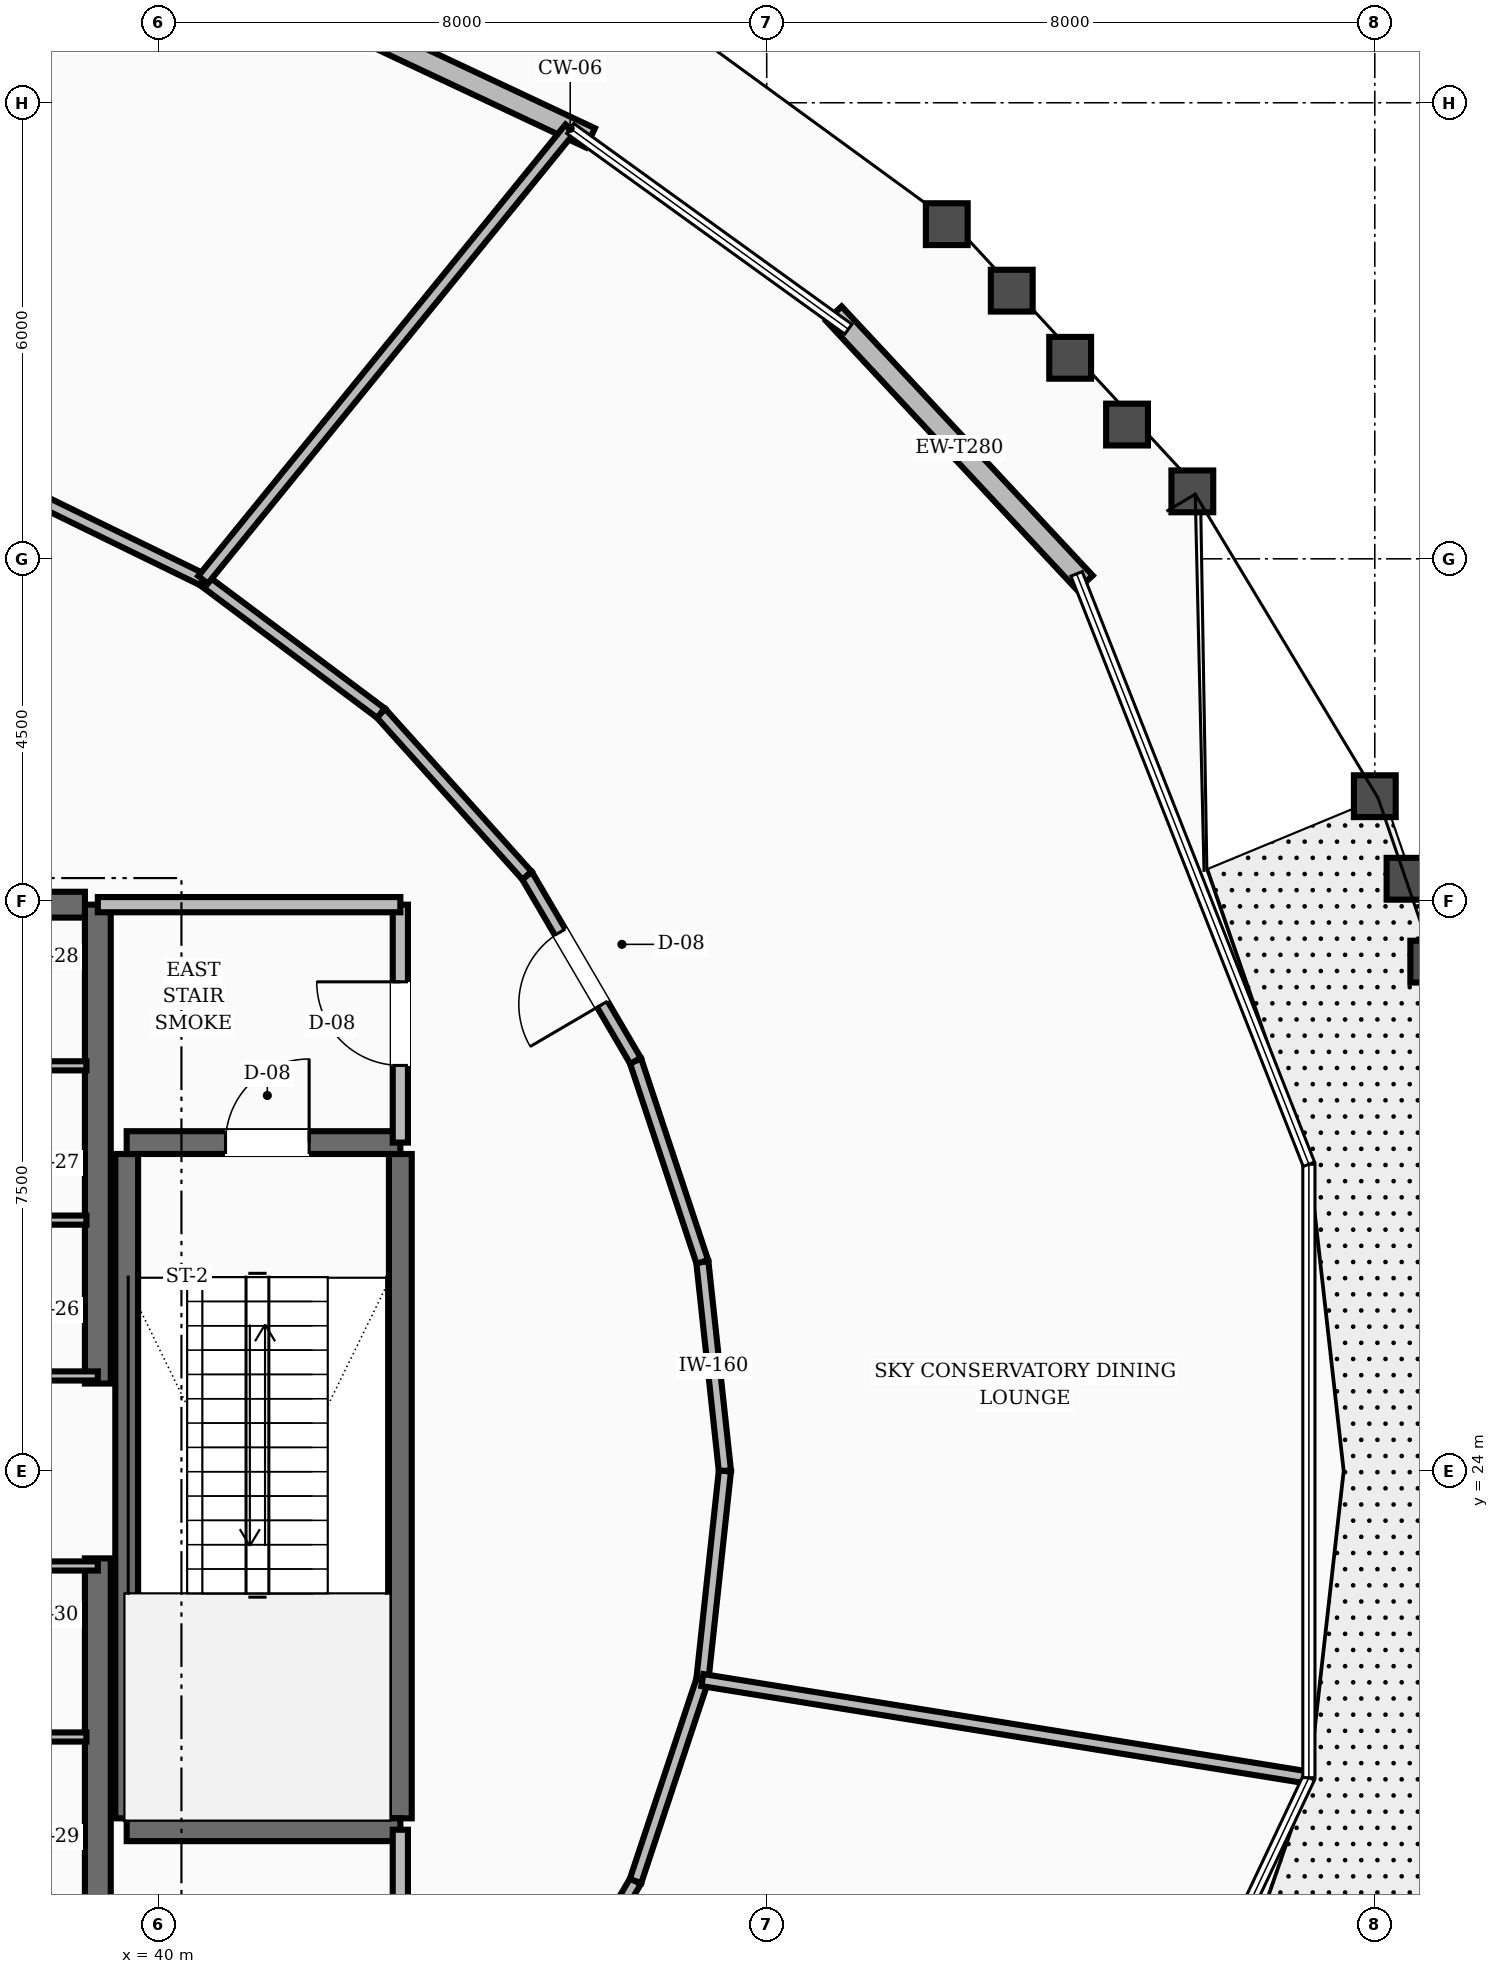
"""IFC4 building model, lengths in metres.
Left out: names, types, materials, properties, quantities, classifications, styles, units other than length and angle.
Written with IfcOpenShell. Run it as: python <this file> out.ifc"""

import sys

from ifc_helpers import new_model, si_unit, direction, frame, frame_2d, origin, place, context, subcontext, project, spatial, rectangle, extrude, element, fill, save


model = new_model("IFC4")
c1 = context("Model", 3, precision=1e-05, world=origin(), true_north=direction((0.0, 1.0)))
c2 = subcontext(c1, "Body", "Model", "MODEL_VIEW")
j1 = project(units=[si_unit("LENGTHUNIT", "METRE"), si_unit("PLANEANGLEUNIT", "RADIAN")], contexts=[c1])
p1 = place(None, origin())
s1 = spatial("IfcSite", under=j1, at=p1, CompositionType="ELEMENT")
p2 = place(p1, origin())
s2 = spatial("IfcBuilding", under=s1, at=p2, CompositionType="ELEMENT")
p3 = place(p2, frame((0.0, 0.0, 203.6)))
s3 = spatial("IfcBuildingStorey", under=s2, at=p3, CompositionType="ELEMENT", Elevation=203.6)
for number, where, z_axis, x_axis in (
    (1, (39.2, 16.55, 0.0), (0.0, 0.0, 1.0), (0.0, 1.0, 0.0)),
    (2, (39.2, 25.15, 0.0), (0.0, 0.0, 1.0), (0.0, 1.0, 0.0)),
):
    element("IfcWall", number, at=place(p3, frame(where, z_axis=z_axis, x_axis=x_axis)), inside=s3, PredefinedType="SHEAR", context=c2, shape_type="SweptSolid", body=[
        extrude(rectangle(XDim=6.3, YDim=0.34, at=frame_2d((3.15, 0.0))), origin(), (0.0, 0.0, 1.0), 4.8),
    ])
p4 = place(p3, frame((35.8, 31.45, 0.0), z_axis=(0.0, 0.0, 1.0), x_axis=(1.0, 0.0, 0.0)))
e3 = element("IfcWall", 3, at=p4, inside=s3, PredefinedType="SHEAR", context=c2, shape_type="SweptSolid", body=[
    extrude(rectangle(XDim=3.23, YDim=0.34, at=frame_2d((1.615, 0.0))), origin(), (0.0, 0.0, 1.0), 4.8),
])
p5 = place(p4, frame((0.3, 0.0, 0.0)))
e4 = element("IfcOpeningElement", 4, at=p5, cuts=e3, PredefinedType="OPENING", context=c2, shape_type="SweptSolid", body=[
    extrude(rectangle(XDim=1.1, YDim=2.1, at=frame_2d((0.55, 1.05))), frame((0.0, 0.18, 0.0), z_axis=(0.0, -1.0, 0.0), x_axis=(1.0, 0.0, 0.0)), (0.0, 0.0, 1.0), 0.36),
])
for number, where, z_axis, x_axis in (
    (5, (43.18, 19.43, 0.0), (0.0, 0.0, 1.0), (0.0, 1.0, 0.0)),
    (6, (39.58, 19.43, 0.0), (0.0, 0.0, 1.0), (0.0, 1.0, 0.0)),
):
    element("IfcWall", number, at=place(p3, frame(where, z_axis=z_axis, x_axis=x_axis)), inside=s3, PredefinedType="SHEAR", context=c2, shape_type="SweptSolid", body=[
        extrude(rectangle(XDim=8.74, YDim=0.3, at=frame_2d((4.37, 0.0))), origin(), (0.0, 0.0, 1.0), 4.8),
    ])
p6 = place(p3, frame((39.58, 19.28, 0.0), z_axis=(0.0, 0.0, 1.0), x_axis=(1.0, 0.0, 0.0)))
e7 = element("IfcWall", 7, at=p6, inside=s3, PredefinedType="SHEAR", context=c2, shape_type="SweptSolid", body=[
    extrude(rectangle(XDim=3.6, YDim=0.3, at=frame_2d((1.8, 0.0))), origin(), (0.0, 0.0, 1.0), 4.8),
])
p7 = place(p3, frame((39.58, 28.32, 0.0), z_axis=(0.0, 0.0, 1.0), x_axis=(1.0, 0.0, 0.0)))
e8 = element("IfcWall", 8, at=p7, inside=s3, PredefinedType="SHEAR", context=c2, shape_type="SweptSolid", body=[
    extrude(rectangle(XDim=3.6, YDim=0.3, at=frame_2d((1.8, 0.0))), origin(), (0.0, 0.0, 1.0), 4.8),
])
p8 = place(p7, frame((1.3, 0.0, 0.0)))
e9 = element("IfcOpeningElement", 9, at=p8, cuts=e8, PredefinedType="OPENING", context=c2, shape_type="SweptSolid", body=[
    extrude(rectangle(XDim=1.1, YDim=2.1, at=frame_2d((0.55, 1.05))), frame((0.0, 0.16, 0.0), z_axis=(0.0, -1.0, 0.0), x_axis=(1.0, 0.0, 0.0)), (0.0, 0.0, 1.0), 0.32),
])
p9 = place(p3, frame((52.186, 35.685, 0.0), z_axis=(0.0, 0.0, 1.0), x_axis=(-0.682124199055, 0.731236334617, 0.0)))
e10 = element("IfcWall", 10, at=p9, inside=s3, PredefinedType="STANDARD", context=c2, shape_type="SweptSolid", body=[
    extrude(rectangle(XDim=4.842, YDim=0.28, at=frame_2d((2.421, 0.0))), origin(), (0.0, 0.0, 1.0), 3.71),
])
p10 = place(p3, frame((45.68, 41.538, 0.0), z_axis=(0.0, 0.0, 1.0), x_axis=(-0.904923833453, 0.425573560796, 0.0)))
e11 = element("IfcWall", 11, at=p10, inside=s3, PredefinedType="STANDARD", context=c2, shape_type="SweptSolid", body=[
    extrude(rectangle(XDim=4.999, YDim=0.28, at=frame_2d((2.499, 0.0))), origin(), (0.0, 0.0, 1.0), 3.71),
])
p11 = place(p3, frame((43.18, 28.32, 0.0), z_axis=(0.0, 0.0, 1.0), x_axis=(0.0, 1.0, 0.0)))
e12 = element("IfcWall", 12, at=p11, inside=s3, PredefinedType="SOLIDWALL", context=c2, shape_type="SweptSolid", body=[
    extrude(rectangle(XDim=3.13, YDim=0.2, at=frame_2d((1.565, 0.0))), origin(), (0.0, 0.0, 1.0), 3.71),
])
p12 = place(p11, frame((1.015, 0.0, 0.0)))
e13 = element("IfcOpeningElement", 13, at=p12, cuts=e12, PredefinedType="OPENING", context=c2, shape_type="SweptSolid", body=[
    extrude(rectangle(XDim=1.1, YDim=2.1, at=frame_2d((0.55, 1.05))), frame((0.0, 0.11, 0.0), z_axis=(0.0, -1.0, 0.0), x_axis=(1.0, 0.0, 0.0)), (0.0, 0.0, 1.0), 0.22),
])
p13 = place(p3, frame((39.2, 31.45, 0.0), z_axis=(0.0, 0.0, 1.0), x_axis=(1.0, 0.0, 0.0)))
e14 = element("IfcWall", 14, at=p13, inside=s3, PredefinedType="SOLIDWALL", context=c2, shape_type="SweptSolid", body=[
    extrude(rectangle(XDim=3.98, YDim=0.2, at=frame_2d((1.99, 0.0))), origin(), (0.0, 0.0, 1.0), 3.71),
])
p14 = place(p3, frame((43.18, 16.55, 0.0), z_axis=(0.0, 0.0, 1.0), x_axis=(0.0, 1.0, 0.0)))
e15 = element("IfcWall", 15, at=p14, inside=s3, PredefinedType="SOLIDWALL", context=c2, shape_type="SweptSolid", body=[
    extrude(rectangle(XDim=2.73, YDim=0.2, at=frame_2d((1.365, 0.0))), origin(), (0.0, 0.0, 1.0), 3.71),
])
p15 = place(p14, frame((0.89, 0.0, 0.0)))
e16 = element("IfcOpeningElement", 16, at=p15, cuts=e15, PredefinedType="OPENING", context=c2, shape_type="SweptSolid", body=[
    extrude(rectangle(XDim=0.95, YDim=2.1, at=frame_2d((0.475, 1.05))), frame((0.0, 0.11, 0.0), z_axis=(0.0, -1.0, 0.0), x_axis=(1.0, 0.0, 0.0)), (0.0, 0.0, 1.0), 0.22),
])
for number, where, z_axis, x_axis in (
    (17, (37.4, 25.25, 0.0), (0.0, 0.0, 1.0), (1.0, 0.0, 0.0)),
    (18, (37.4, 22.75, 0.0), (0.0, 0.0, 1.0), (1.0, 0.0, 0.0)),
):
    element("IfcWall", number, at=place(p3, frame(where, z_axis=z_axis, x_axis=x_axis)), inside=s3, PredefinedType="PARTITIONING", context=c2, shape_type="SweptSolid", body=[
        extrude(rectangle(XDim=1.8, YDim=0.12, at=frame_2d((0.9, 0.0))), origin(), (0.0, 0.0, 1.0), 3.71),
    ])
for number, where, z_axis, x_axis in (
    (19, (37.4, 27.3, 0.0), (0.0, 0.0, 1.0), (1.0, 0.0, 0.0)),
    (20, (37.4, 29.33, 0.0), (0.0, 0.0, 1.0), (1.0, 0.0, 0.0)),
    (21, (37.4, 20.5, 0.0), (0.0, 0.0, 1.0), (1.0, 0.0, 0.0)),
):
    element("IfcWall", number, at=place(p3, frame(where, z_axis=z_axis, x_axis=x_axis)), inside=s3, PredefinedType="PARTITIONING", context=c2, shape_type="SweptSolid", body=[
        extrude(rectangle(XDim=1.65, YDim=0.12, at=frame_2d((0.825, 0.0))), origin(), (0.0, 0.0, 1.0), 3.71),
    ])
p16 = place(p3, frame((47.45, 24.0, 0.0), z_axis=(0.0, 0.0, 1.0), x_axis=(-0.107302680622, 0.994226400138, 0.0)))
e22 = element("IfcWall", 22, at=p16, inside=s3, PredefinedType="SOLIDWALL", context=c2, shape_type="SweptSolid", body=[
    extrude(rectangle(XDim=2.767, YDim=0.16, at=frame_2d((1.383, 0.0))), origin(), (0.0, 0.0, 1.0), 3.71),
])
p17 = place(p3, frame((47.153, 26.751, 0.0), z_axis=(0.0, 0.0, 1.0), x_axis=(-0.315413058649, 0.948954478589, 0.0)))
e23 = element("IfcWall", 23, at=p17, inside=s3, PredefinedType="SOLIDWALL", context=c2, shape_type="SweptSolid", body=[
    extrude(rectangle(XDim=2.787, YDim=0.16, at=frame_2d((1.394, 0.0))), origin(), (0.0, 0.0, 1.0), 3.71),
])
p18 = place(p3, frame((46.274, 29.396, 0.0), z_axis=(0.0, 0.0, 1.0), x_axis=(-0.505380130961, 0.862896820732, 0.0)))
e24 = element("IfcWall", 24, at=p18, inside=s3, PredefinedType="SOLIDWALL", context=c2, shape_type="SweptSolid", body=[
    extrude(rectangle(XDim=2.825, YDim=0.16, at=frame_2d((1.413, 0.0))), origin(), (0.0, 0.0, 1.0), 3.71),
])
p19 = place(p18, frame((0.863, 0.0, 0.0)))
e25 = element("IfcOpeningElement", 25, at=p19, cuts=e24, PredefinedType="OPENING", context=c2, shape_type="SweptSolid", body=[
    extrude(rectangle(XDim=1.1, YDim=2.1, at=frame_2d((0.55, 1.05))), frame((0.0, 0.09, 0.0), z_axis=(0.0, -1.0, 0.0), x_axis=(1.0, 0.0, 0.0)), (0.0, 0.0, 1.0), 0.18),
])
p20 = place(p3, frame((44.846, 31.833, 0.0), z_axis=(0.0, 0.0, 1.0), x_axis=(-0.668645478294, 0.743581350194, 0.0)))
e26 = element("IfcWall", 26, at=p20, inside=s3, PredefinedType="SOLIDWALL", context=c2, shape_type="SweptSolid", body=[
    extrude(rectangle(XDim=2.874, YDim=0.16, at=frame_2d((1.437, 0.0))), origin(), (0.0, 0.0, 1.0), 3.71),
])
p21 = place(p3, frame((42.925, 33.97, 0.0), z_axis=(0.0, 0.0, 1.0), x_axis=(-0.800420462314, 0.599438973966, 0.0)))
e27 = element("IfcWall", 27, at=p21, inside=s3, PredefinedType="SOLIDWALL", context=c2, shape_type="SweptSolid", body=[
    extrude(rectangle(XDim=2.925, YDim=0.16, at=frame_2d((1.462, 0.0))), origin(), (0.0, 0.0, 1.0), 3.71),
])
p22 = place(p3, frame((40.583, 35.724, 0.0), z_axis=(0.0, 0.0, 1.0), x_axis=(-0.898755022802, 0.438451147778, 0.0)))
e28 = element("IfcWall", 28, at=p22, inside=s3, PredefinedType="SOLIDWALL", context=c2, shape_type="SweptSolid", body=[
    extrude(rectangle(XDim=2.972, YDim=0.16, at=frame_2d((1.486, 0.0))), origin(), (0.0, 0.0, 1.0), 3.71),
])
p23 = place(p3, frame((44.846, 16.167, 0.0), z_axis=(0.0, 0.0, 1.0), x_axis=(0.505380130961, 0.862896820732, 0.0)))
e29 = element("IfcWall", 29, at=p23, inside=s3, PredefinedType="SOLIDWALL", context=c2, shape_type="SweptSolid", body=[
    extrude(rectangle(XDim=2.825, YDim=0.16, at=frame_2d((1.413, 0.0))), origin(), (0.0, 0.0, 1.0), 3.71),
])
p24 = place(p3, frame((46.274, 18.604, 0.0), z_axis=(0.0, 0.0, 1.0), x_axis=(0.315413058649, 0.948954478589, 0.0)))
e30 = element("IfcWall", 30, at=p24, inside=s3, PredefinedType="SOLIDWALL", context=c2, shape_type="SweptSolid", body=[
    extrude(rectangle(XDim=2.787, YDim=0.16, at=frame_2d((1.394, 0.0))), origin(), (0.0, 0.0, 1.0), 3.71),
])
p25 = place(p3, frame((47.153, 21.249, 0.0), z_axis=(0.0, 0.0, 1.0), x_axis=(0.107302680622, 0.994226400138, 0.0)))
e31 = element("IfcWall", 31, at=p25, inside=s3, PredefinedType="SOLIDWALL", context=c2, shape_type="SweptSolid", body=[
    extrude(rectangle(XDim=2.767, YDim=0.16, at=frame_2d((1.383, 0.0))), origin(), (0.0, 0.0, 1.0), 3.71),
])
p26 = place(p3, frame((47.153, 21.249, 0.0), z_axis=(0.0, 0.0, 1.0), x_axis=(0.987292230492, -0.158915234041, 0.0)))
e32 = element("IfcWall", 32, at=p26, inside=s3, PredefinedType="SOLIDWALL", context=c2, shape_type="SweptSolid", body=[
    extrude(rectangle(XDim=8.083, YDim=0.16, at=frame_2d((4.041, 0.0))), origin(), (0.0, 0.0, 1.0), 3.71),
])
p27 = place(p3, frame((40.583, 35.724, 0.0), z_axis=(0.0, 0.0, 1.0), x_axis=(0.631040308845, 0.775750042613, 0.0)))
e33 = element("IfcWall", 33, at=p27, inside=s3, PredefinedType="SOLIDWALL", context=c2, shape_type="SweptSolid", body=[
    extrude(rectangle(XDim=7.656, YDim=0.16, at=frame_2d((3.828, 0.0))), origin(), (0.0, 0.0, 1.0), 3.71),
])
p28 = place(p8, origin())
e34 = element("IfcDoor", 34, at=p28, inside=s3, OperationType="SINGLE_SWING_RIGHT", PredefinedType="DOOR", context=c2, shape_type="SweptSolid", body=[
    extrude(rectangle(XDim=1.1, YDim=2.1, at=frame_2d((0.55, 1.05))), frame((0.0, 0.025, 0.0), z_axis=(0.0, -1.0, 0.0), x_axis=(1.0, 0.0, 0.0)), (0.0, 0.0, 1.0), 0.05),
])
fill(e9, e34)
p29 = place(p12, origin())
e35 = element("IfcDoor", 35, at=p29, inside=s3, OperationType="SINGLE_SWING_RIGHT", PredefinedType="DOOR", context=c2, shape_type="SweptSolid", body=[
    extrude(rectangle(XDim=1.1, YDim=2.1, at=frame_2d((0.55, 1.05))), frame((0.0, 0.025, 0.0), z_axis=(0.0, -1.0, 0.0), x_axis=(1.0, 0.0, 0.0)), (0.0, 0.0, 1.0), 0.05),
])
fill(e13, e35)
p30 = place(p19, origin())
e36 = element("IfcDoor", 36, at=p30, inside=s3, OperationType="SINGLE_SWING_LEFT", PredefinedType="DOOR", context=c2, shape_type="SweptSolid", body=[
    extrude(rectangle(XDim=1.1, YDim=2.1, at=frame_2d((0.55, 1.05))), frame((0.0, 0.025, 0.0), z_axis=(0.0, -1.0, 0.0), x_axis=(1.0, 0.0, 0.0)), (0.0, 0.0, 1.0), 0.05),
])
fill(e25, e36)
save(model, sys.argv[1])
